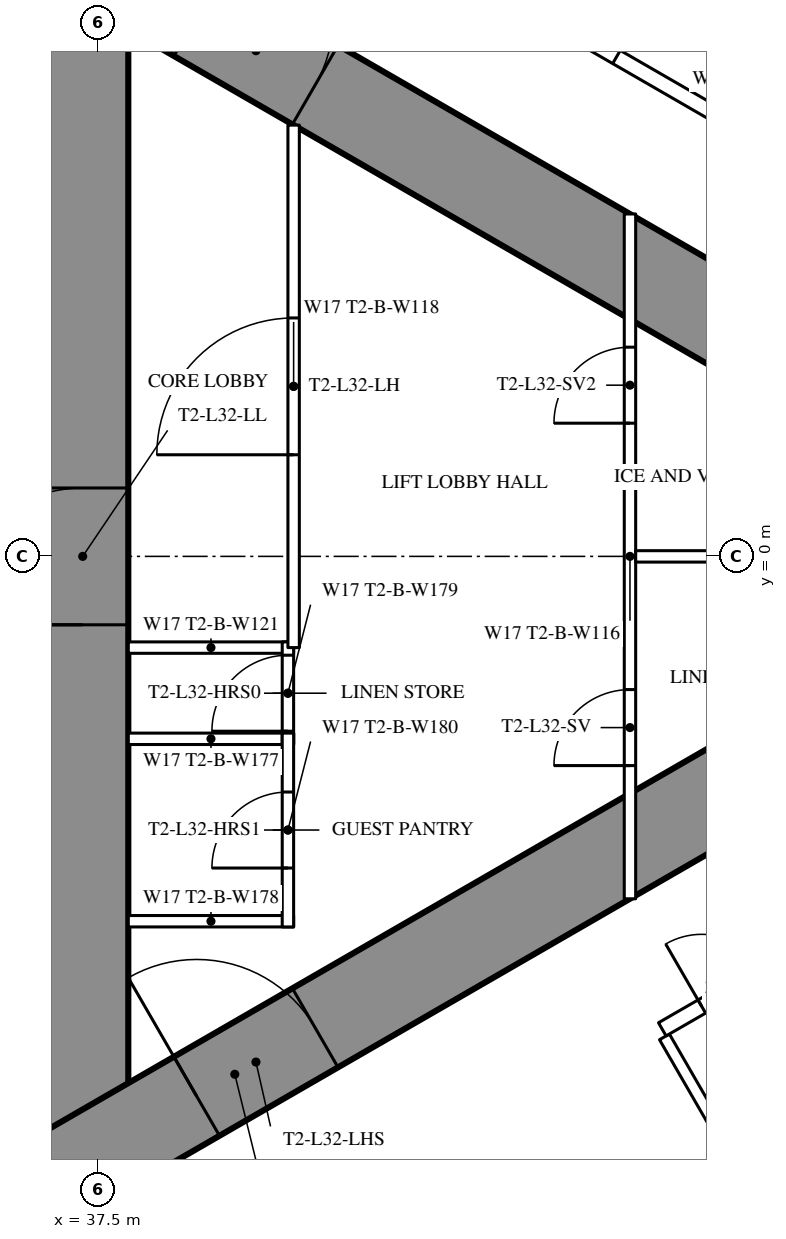
"""IFC4 building model, lengths in metres.
Left out: names, types, materials, properties, quantities, classifications, styles, units other than length and angle.
Written with IfcOpenShell. Run it as: python <this file> out.ifc"""

import sys

from ifc_helpers import new_model, si_unit, direction, frame, frame_2d, origin, place, context, subcontext, project, spatial, rectangle, extrude, element, fill, save


model = new_model("IFC4")
c1 = context("Model", 3, precision=1e-05, world=origin(), true_north=direction((0.0, 1.0)))
c2 = subcontext(c1, "Body", "Model", "MODEL_VIEW")
j1 = project(units=[si_unit("LENGTHUNIT", "METRE"), si_unit("PLANEANGLEUNIT", "RADIAN")], contexts=[c1])
p1 = place(None, origin())
s1 = spatial("IfcSite", under=j1, at=p1, CompositionType="ELEMENT")
p2 = place(p1, origin())
s2 = spatial("IfcBuilding", under=s1, at=p2, CompositionType="ELEMENT")
p3 = place(p2, frame((0.0, 0.0, 122.1)))
s3 = spatial("IfcBuildingStorey", under=s2, at=p3, CompositionType="ELEMENT", Elevation=122.1)
p4 = place(p3, frame((37.3, -8.6, 0.0), z_axis=(0.0, 0.0, 1.0), x_axis=(0.0, 1.0, 0.0)))
e1 = element("IfcWall", 1, at=p4, inside=s3, PredefinedType="SHEAR", context=c2, shape_type="SweptSolid", body=[
    extrude(rectangle(XDim=17.2, YDim=1.2, at=frame_2d((8.6, 0.0))), origin(), (0.0, 0.0, 1.0), 3.5),
])
p5 = place(p4, frame((7.7, 0.0, 0.0)))
e2 = element("IfcOpeningElement", 2, at=p5, cuts=e1, PredefinedType="OPENING", context=c2, shape_type="SweptSolid", body=[
    extrude(rectangle(XDim=1.8, YDim=2.2, at=frame_2d((0.9, 1.1))), frame((0.0, 0.61, 0.0), z_axis=(0.0, -1.0, 0.0), x_axis=(1.0, 0.0, 0.0)), (0.0, 0.0, 1.0), 1.22),
])
p6 = place(p3, frame((27.2, -13.8, 0.0), z_axis=(0.0, 0.0, 1.0), x_axis=(0.866027159892, 0.499996958321, 0.0)))
e3 = element("IfcWall", 3, at=p6, inside=s3, PredefinedType="SHEAR", context=c2, shape_type="SweptSolid", body=[
    extrude(rectangle(XDim=27.947, YDim=1.2, at=frame_2d((13.973, 0.0))), origin(), (0.0, 0.0, 1.0), 3.5),
])
p7 = place(p6, frame((4.6, 0.0, 0.0)))
e4 = element("IfcOpeningElement", 4, at=p7, cuts=e3, PredefinedType="OPENING", context=c2, shape_type="SweptSolid", body=[
    extrude(rectangle(XDim=1.0, YDim=2.2, at=frame_2d((0.5, 1.1))), frame((0.0, 0.61, 0.0), z_axis=(0.0, -1.0, 0.0), x_axis=(1.0, 0.0, 0.0)), (0.0, 0.0, 1.0), 1.22),
])
p8 = place(p6, frame((13.395, 0.0, 0.0)))
e5 = element("IfcOpeningElement", 5, at=p8, cuts=e3, PredefinedType="OPENING", context=c2, shape_type="SweptSolid", body=[
    extrude(rectangle(XDim=1.8, YDim=2.2, at=frame_2d((0.9, 1.1))), frame((0.0, 0.61, 0.0), z_axis=(0.0, -1.0, 0.0), x_axis=(1.0, 0.0, 0.0)), (0.0, 0.0, 1.0), 1.22),
])
p9 = place(p3, frame((27.2, 13.8, 0.0), z_axis=(0.0, 0.0, 1.0), x_axis=(0.866024515034, -0.500001539357, 0.0)))
e6 = element("IfcWall", 6, at=p9, inside=s3, PredefinedType="SHEAR", context=c2, shape_type="SweptSolid", body=[
    extrude(rectangle(XDim=26.907, YDim=1.2, at=frame_2d((13.454, 0.0))), origin(), (0.0, 0.0, 1.0), 3.5),
])
p10 = place(p9, frame((4.6, 0.0, 0.0)))
e7 = element("IfcOpeningElement", 7, at=p10, cuts=e6, PredefinedType="OPENING", context=c2, shape_type="SweptSolid", body=[
    extrude(rectangle(XDim=1.0, YDim=2.2, at=frame_2d((0.5, 1.1))), frame((0.0, 0.61, 0.0), z_axis=(0.0, -1.0, 0.0), x_axis=(1.0, 0.0, 0.0)), (0.0, 0.0, 1.0), 1.22),
])
p11 = place(p9, frame((13.395, 0.0, 0.0)))
e8 = element("IfcOpeningElement", 8, at=p11, cuts=e6, PredefinedType="OPENING", context=c2, shape_type="SweptSolid", body=[
    extrude(rectangle(XDim=1.8, YDim=2.2, at=frame_2d((0.9, 1.1))), frame((0.0, 0.61, 0.0), z_axis=(0.0, -1.0, 0.0), x_axis=(1.0, 0.0, 0.0)), (0.0, 0.0, 1.0), 1.22),
])
p12 = place(p3, frame((44.954, -6.321, 0.0), z_axis=(0.0, 0.0, 1.0), x_axis=(0.500018676722, -0.866014620505, 0.0)))
e9 = element("IfcWall", 9, at=p12, inside=s3, PredefinedType="PARTITIONING", context=c2, shape_type="SweptSolid", body=[
    extrude(rectangle(XDim=8.704, YDim=0.15, at=frame_2d((4.352, 0.0))), origin(), (0.0, 0.0, 1.0), 2.2),
])
p13 = place(p3, frame((36.834, 10.894, 0.0), z_axis=(0.0, 0.0, 1.0), x_axis=(0.866028157229, -0.499995230863, 0.0)))
e10 = element("IfcWall", 10, at=p13, inside=s3, PredefinedType="PARTITIONING", context=c2, shape_type="SweptSolid", body=[
    extrude(rectangle(XDim=21.667, YDim=0.2, at=frame_2d((10.833, 0.0))), origin(), (0.0, 0.0, 1.0), 3.25),
])
p14 = place(p13, frame((20.117, 0.0, 0.0)))
e11 = element("IfcOpeningElement", 11, at=p14, cuts=e10, PredefinedType="OPENING", context=c2, shape_type="SweptSolid", body=[
    extrude(rectangle(XDim=0.95, YDim=2.2, at=frame_2d((0.475, 1.1))), frame((0.0, 0.11, 0.0), z_axis=(0.0, -1.0, 0.0), x_axis=(1.0, 0.0, 0.0)), (0.0, 0.0, 1.0), 0.22),
])
p15 = place(p13, frame((14.04, 0.0, 0.0)))
e12 = element("IfcOpeningElement", 12, at=p15, cuts=e10, PredefinedType="OPENING", context=c2, shape_type="SweptSolid", body=[
    extrude(rectangle(XDim=0.95, YDim=2.2, at=frame_2d((0.475, 1.1))), frame((0.0, 0.11, 0.0), z_axis=(0.0, -1.0, 0.0), x_axis=(1.0, 0.0, 0.0)), (0.0, 0.0, 1.0), 0.22),
])
p16 = place(p13, frame((7.697, 0.0, 0.0)))
e13 = element("IfcOpeningElement", 13, at=p16, cuts=e10, PredefinedType="OPENING", context=c2, shape_type="SweptSolid", body=[
    extrude(rectangle(XDim=0.95, YDim=2.2, at=frame_2d((0.475, 1.1))), frame((0.0, 0.11, 0.0), z_axis=(0.0, -1.0, 0.0), x_axis=(1.0, 0.0, 0.0)), (0.0, 0.0, 1.0), 0.22),
])
p17 = place(p13, frame((3.35, 0.0, 0.0)))
e14 = element("IfcOpeningElement", 14, at=p17, cuts=e10, PredefinedType="OPENING", context=c2, shape_type="SweptSolid", body=[
    extrude(rectangle(XDim=1.0, YDim=2.2, at=frame_2d((0.5, 1.1))), frame((0.0, 0.11, 0.0), z_axis=(0.0, -1.0, 0.0), x_axis=(1.0, 0.0, 0.0)), (0.0, 0.0, 1.0), 0.22),
])
p18 = place(p3, frame((44.925, -6.222, 0.0), z_axis=(0.0, 0.0, 1.0), x_axis=(0.866020269055, 0.500008893506, 0.0)))
e15 = element("IfcWall", 15, at=p18, inside=s3, PredefinedType="PARTITIONING", context=c2, shape_type="SweptSolid", body=[
    extrude(rectangle(XDim=12.444, YDim=0.2, at=frame_2d((6.222, 0.0))), origin(), (0.0, 0.0, 1.0), 3.25),
])
p19 = place(p18, frame((0.6, 0.0, 0.0)))
e16 = element("IfcOpeningElement", 16, at=p19, cuts=e15, PredefinedType="OPENING", context=c2, shape_type="SweptSolid", body=[
    extrude(rectangle(XDim=0.95, YDim=2.2, at=frame_2d((0.475, 1.1))), frame((0.0, 0.11, 0.0), z_axis=(0.0, -1.0, 0.0), x_axis=(1.0, 0.0, 0.0)), (0.0, 0.0, 1.0), 0.22),
])
p20 = place(p18, frame((7.047, 0.0, 0.0)))
e17 = element("IfcOpeningElement", 17, at=p20, cuts=e15, PredefinedType="OPENING", context=c2, shape_type="SweptSolid", body=[
    extrude(rectangle(XDim=0.95, YDim=2.2, at=frame_2d((0.475, 1.1))), frame((0.0, 0.11, 0.0), z_axis=(0.0, -1.0, 0.0), x_axis=(1.0, 0.0, 0.0)), (0.0, 0.0, 1.0), 0.22),
])
for number, where, z_axis, x_axis in (
    (18, (37.9, -1.2, 0.0), (0.0, 0.0, 1.0), (1.0, 0.0, 0.0)),
    (19, (37.9, -2.4, 0.0), (0.0, 0.0, 1.0), (1.0, 0.0, 0.0)),
    (20, (37.9, -4.8, 0.0), (0.0, 0.0, 1.0), (1.0, 0.0, 0.0)),
):
    element("IfcWall", number, at=place(p3, frame(where, z_axis=z_axis, x_axis=x_axis)), inside=s3, PredefinedType="PARTITIONING", context=c2, shape_type="SweptSolid", body=[
        extrude(rectangle(XDim=2.175, YDim=0.15, at=frame_2d((1.087, 0.0))), origin(), (0.0, 0.0, 1.0), 3.25),
    ])
p21 = place(p3, frame((40.0, -2.475, 0.0), z_axis=(0.0, 0.0, 1.0), x_axis=(0.0, 1.0, 0.0)))
e21 = element("IfcWall", 21, at=p21, inside=s3, PredefinedType="PARTITIONING", context=c2, shape_type="SweptSolid", body=[
    extrude(rectangle(XDim=1.35, YDim=0.15, at=frame_2d((0.675, 0.0))), origin(), (0.0, 0.0, 1.0), 3.25),
])
p22 = place(p21, frame((0.175, 0.0, 0.0)))
e22 = element("IfcOpeningElement", 22, at=p22, cuts=e21, PredefinedType="OPENING", context=c2, shape_type="SweptSolid", body=[
    extrude(rectangle(XDim=1.0, YDim=2.2, at=frame_2d((0.5, 1.1))), frame((0.0, 0.085, 0.0), z_axis=(0.0, -1.0, 0.0), x_axis=(1.0, 0.0, 0.0)), (0.0, 0.0, 1.0), 0.17),
])
p23 = place(p3, frame((40.0, -4.875, 0.0), z_axis=(0.0, 0.0, 1.0), x_axis=(0.0, 1.0, 0.0)))
e23 = element("IfcWall", 23, at=p23, inside=s3, PredefinedType="PARTITIONING", context=c2, shape_type="SweptSolid", body=[
    extrude(rectangle(XDim=2.55, YDim=0.15, at=frame_2d((1.275, 0.0))), origin(), (0.0, 0.0, 1.0), 3.25),
])
p24 = place(p23, frame((0.775, 0.0, 0.0)))
e24 = element("IfcOpeningElement", 24, at=p24, cuts=e23, PredefinedType="OPENING", context=c2, shape_type="SweptSolid", body=[
    extrude(rectangle(XDim=1.0, YDim=2.2, at=frame_2d((0.5, 1.1))), frame((0.0, 0.085, 0.0), z_axis=(0.0, -1.0, 0.0), x_axis=(1.0, 0.0, 0.0)), (0.0, 0.0, 1.0), 0.17),
])
p25 = place(p3, frame((40.075, -1.2, 0.0), z_axis=(0.0, 0.0, 1.0), x_axis=(0.0, 1.0, 0.0)))
e25 = element("IfcWall", 25, at=p25, inside=s3, PredefinedType="PARTITIONING", context=c2, shape_type="SweptSolid", body=[
    extrude(rectangle(XDim=6.874, YDim=0.15, at=frame_2d((3.437, 0.0))), origin(), (0.0, 0.0, 1.0), 3.25),
])
p26 = place(p25, frame((2.537, 0.0, 0.0)))
e26 = element("IfcOpeningElement", 26, at=p26, cuts=e25, PredefinedType="OPENING", context=c2, shape_type="SweptSolid", body=[
    extrude(rectangle(XDim=1.8, YDim=2.2, at=frame_2d((0.9, 1.1))), frame((0.0, 0.085, 0.0), z_axis=(0.0, -1.0, 0.0), x_axis=(1.0, 0.0, 0.0)), (0.0, 0.0, 1.0), 0.17),
])
p27 = place(p3, frame((44.5, -4.505, 0.0), z_axis=(0.0, 0.0, 1.0), x_axis=(0.0, 1.0, 0.0)))
e27 = element("IfcWall", 27, at=p27, inside=s3, PredefinedType="PARTITIONING", context=c2, shape_type="SweptSolid", body=[
    extrude(rectangle(XDim=9.009, YDim=0.15, at=frame_2d((4.505, 0.0))), origin(), (0.0, 0.0, 1.0), 2.45),
])
p28 = place(p27, frame((1.752, 0.0, 0.0)))
e28 = element("IfcOpeningElement", 28, at=p28, cuts=e27, PredefinedType="OPENING", context=c2, shape_type="SweptSolid", body=[
    extrude(rectangle(XDim=1.0, YDim=2.2, at=frame_2d((0.5, 1.1))), frame((0.0, 0.085, 0.0), z_axis=(0.0, -1.0, 0.0), x_axis=(1.0, 0.0, 0.0)), (0.0, 0.0, 1.0), 0.17),
])
p29 = place(p27, frame((6.257, 0.0, 0.0)))
e29 = element("IfcOpeningElement", 29, at=p29, cuts=e27, PredefinedType="OPENING", context=c2, shape_type="SweptSolid", body=[
    extrude(rectangle(XDim=1.0, YDim=2.2, at=frame_2d((0.5, 1.1))), frame((0.0, 0.085, 0.0), z_axis=(0.0, -1.0, 0.0), x_axis=(1.0, 0.0, 0.0)), (0.0, 0.0, 1.0), 0.17),
])
p30 = place(p3, frame((44.575, 0.0, 0.0), z_axis=(0.0, 0.0, 1.0), x_axis=(1.0, 0.0, 0.0)))
e30 = element("IfcWall", 30, at=p30, inside=s3, PredefinedType="PARTITIONING", context=c2, shape_type="SweptSolid", body=[
    extrude(rectangle(XDim=7.727, YDim=0.15, at=frame_2d((3.864, 0.0))), origin(), (0.0, 0.0, 1.0), 2.2),
])
p31 = place(p19, origin())
e31 = element("IfcDoor", 31, at=p31, inside=s3, OperationType="SINGLE_SWING_LEFT", PredefinedType="DOOR", context=c2, shape_type="SweptSolid", body=[
    extrude(rectangle(XDim=0.95, YDim=2.2, at=frame_2d((0.475, 1.1))), frame((0.0, 0.025, 0.0), z_axis=(0.0, -1.0, 0.0), x_axis=(1.0, 0.0, 0.0)), (0.0, 0.0, 1.0), 0.05),
])
fill(e16, e31)
p32 = place(p16, origin())
e32 = element("IfcDoor", 32, at=p32, inside=s3, OperationType="SINGLE_SWING_LEFT", PredefinedType="DOOR", context=c2, shape_type="SweptSolid", body=[
    extrude(rectangle(XDim=0.95, YDim=2.2, at=frame_2d((0.475, 1.1))), frame((0.0, 0.025, 0.0), z_axis=(0.0, -1.0, 0.0), x_axis=(1.0, 0.0, 0.0)), (0.0, 0.0, 1.0), 0.05),
])
fill(e13, e32)
p33 = place(p22, origin())
e33 = element("IfcDoor", 33, at=p33, inside=s3, OperationType="SINGLE_SWING_LEFT", PredefinedType="DOOR", context=c2, shape_type="SweptSolid", body=[
    extrude(rectangle(XDim=1.0, YDim=2.2, at=frame_2d((0.5, 1.1))), frame((0.0, 0.025, 0.0), z_axis=(0.0, -1.0, 0.0), x_axis=(1.0, 0.0, 0.0)), (0.0, 0.0, 1.0), 0.05),
])
fill(e22, e33)
p34 = place(p24, origin())
e34 = element("IfcDoor", 34, at=p34, inside=s3, OperationType="SINGLE_SWING_LEFT", PredefinedType="DOOR", context=c2, shape_type="SweptSolid", body=[
    extrude(rectangle(XDim=1.0, YDim=2.2, at=frame_2d((0.5, 1.1))), frame((0.0, 0.025, 0.0), z_axis=(0.0, -1.0, 0.0), x_axis=(1.0, 0.0, 0.0)), (0.0, 0.0, 1.0), 0.05),
])
fill(e24, e34)
p35 = place(p26, origin())
e35 = element("IfcDoor", 35, at=p35, inside=s3, OperationType="DOUBLE_DOOR_SINGLE_SWING", PredefinedType="DOOR", context=c2, shape_type="SweptSolid", body=[
    extrude(rectangle(XDim=1.8, YDim=2.2, at=frame_2d((0.9, 1.1))), frame((0.0, 0.025, 0.0), z_axis=(0.0, -1.0, 0.0), x_axis=(1.0, 0.0, 0.0)), (0.0, 0.0, 1.0), 0.05),
])
fill(e26, e35)
p36 = place(p28, origin())
e36 = element("IfcDoor", 36, at=p36, inside=s3, OperationType="SINGLE_SWING_LEFT", PredefinedType="DOOR", context=c2, shape_type="SweptSolid", body=[
    extrude(rectangle(XDim=1.0, YDim=2.2, at=frame_2d((0.5, 1.1))), frame((0.0, 0.025, 0.0), z_axis=(0.0, -1.0, 0.0), x_axis=(1.0, 0.0, 0.0)), (0.0, 0.0, 1.0), 0.05),
])
fill(e28, e36)
p37 = place(p29, origin())
e37 = element("IfcDoor", 37, at=p37, inside=s3, OperationType="SINGLE_SWING_LEFT", PredefinedType="DOOR", context=c2, shape_type="SweptSolid", body=[
    extrude(rectangle(XDim=1.0, YDim=2.2, at=frame_2d((0.5, 1.1))), frame((0.0, 0.025, 0.0), z_axis=(0.0, -1.0, 0.0), x_axis=(1.0, 0.0, 0.0)), (0.0, 0.0, 1.0), 0.05),
])
fill(e29, e37)
p38 = place(p8, origin())
e38 = element("IfcDoor", 38, at=p38, inside=s3, OperationType="DOUBLE_DOOR_SINGLE_SWING", PredefinedType="DOOR", context=c2, shape_type="SweptSolid", body=[
    extrude(rectangle(XDim=1.8, YDim=2.2, at=frame_2d((0.9, 1.1))), frame((0.0, 0.025, 0.0), z_axis=(0.0, -1.0, 0.0), x_axis=(1.0, 0.0, 0.0)), (0.0, 0.0, 1.0), 0.05),
])
fill(e5, e38)
p39 = place(p11, origin())
e39 = element("IfcDoor", 39, at=p39, inside=s3, OperationType="DOUBLE_DOOR_SINGLE_SWING", PredefinedType="DOOR", context=c2, shape_type="SweptSolid", body=[
    extrude(rectangle(XDim=1.8, YDim=2.2, at=frame_2d((0.9, 1.1))), frame((0.0, 0.025, 0.0), z_axis=(0.0, -1.0, 0.0), x_axis=(1.0, 0.0, 0.0)), (0.0, 0.0, 1.0), 0.05),
])
fill(e8, e39)
p40 = place(p5, origin())
e40 = element("IfcDoor", 40, at=p40, inside=s3, OperationType="DOUBLE_DOOR_SINGLE_SWING", PredefinedType="DOOR", context=c2, shape_type="SweptSolid", body=[
    extrude(rectangle(XDim=1.8, YDim=2.2, at=frame_2d((0.9, 1.1))), frame((0.0, 0.025, 0.0), z_axis=(0.0, -1.0, 0.0), x_axis=(1.0, 0.0, 0.0)), (0.0, 0.0, 1.0), 0.05),
])
fill(e2, e40)
save(model, sys.argv[1])
